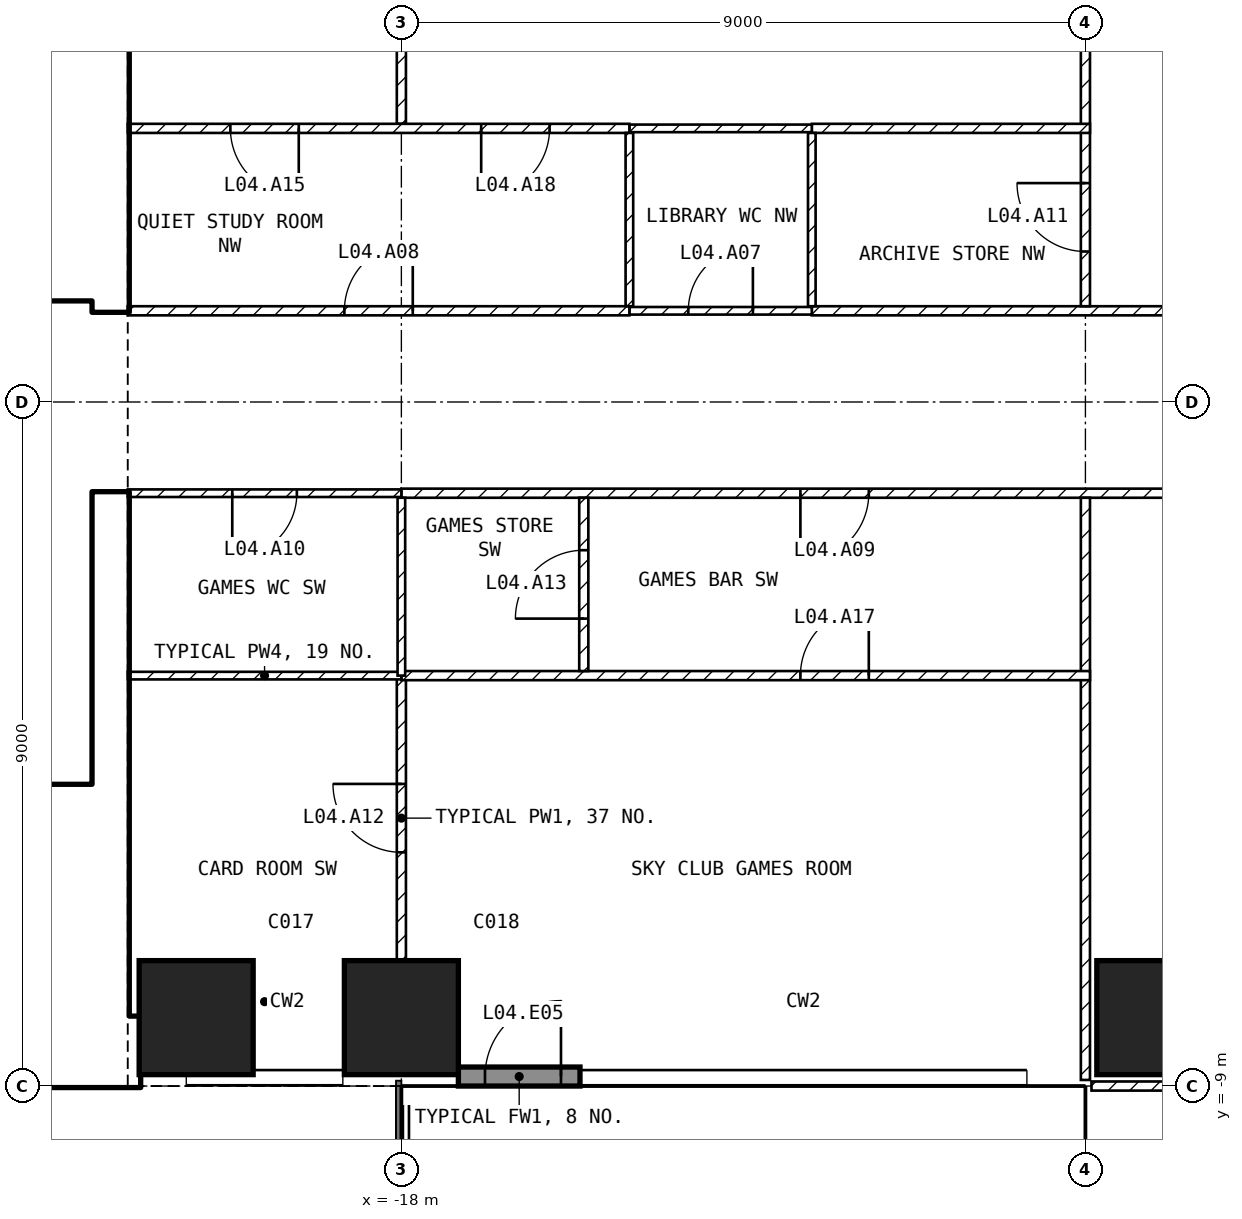
"""IFC4 building model, lengths in metres.
Left out: names, types, materials, properties, quantities, classifications, styles, units other than length and angle.
Written with IfcOpenShell. Run it as: python <this file> out.ifc"""

import sys

from ifc_helpers import new_model, si_unit, direction, frame, frame_2d, origin, origin_2d, place, context, subcontext, project, spatial, rectangle, extrude, element, fill, save


model = new_model("IFC4")
c1 = context("Model", 3, precision=1e-05, world=origin(), true_north=direction((0.0, 1.0)))
c2 = subcontext(c1, "Body", "Model", "MODEL_VIEW")
j1 = project(units=[si_unit("LENGTHUNIT", "METRE"), si_unit("PLANEANGLEUNIT", "RADIAN")], contexts=[c1])
p1 = place(None, origin())
s1 = spatial("IfcSite", under=j1, at=p1, CompositionType="ELEMENT")
p2 = place(p1, origin())
s2 = spatial("IfcBuilding", under=s1, at=p2, CompositionType="ELEMENT")
p3 = place(p2, frame((0.0, 0.0, 32.0)))
s3 = spatial("IfcBuildingStorey", under=s2, at=p3, CompositionType="ELEMENT", Elevation=32.0)
for number, where, z_axis, x_axis in (
    (1, (-20.7, -8.1, -0.3), (0.0, 0.0, 1.0), (1.0, 0.0, 0.0)),
    (2, (-18.0, -8.1, -0.3), (0.0, 0.0, 1.0), (1.0, 0.0, 0.0)),
    (3, (-8.1, -8.1, -0.3), (0.0, 0.0, 1.0), (1.0, 0.0, 0.0)),
):
    element("IfcColumn", number, at=place(p3, frame(where, z_axis=z_axis, x_axis=x_axis)), inside=s3, PredefinedType="COLUMN", context=c2, shape_type="SweptSolid", body=[
        extrude(rectangle(XDim=1.5, YDim=1.5, at=origin_2d()), origin(), (0.0, 0.0, 1.0), 4.55),
    ])
p4 = place(p3, frame((-17.25, -8.875, 0.0), z_axis=(0.0, 0.0, 1.0), x_axis=(1.0, 0.0, 0.0)))
e4 = element("IfcWall", 4, at=p4, inside=s3, PredefinedType="SOLIDWALL", context=c2, shape_type="SweptSolid", body=[
    extrude(rectangle(XDim=1.6, YDim=0.25, at=frame_2d((0.8, 0.0))), origin(), (0.0, 0.0, 1.0), 4.25),
])
p5 = place(p4, frame((0.35, 0.0, 0.0)))
e5 = element("IfcOpeningElement", 5, at=p5, cuts=e4, PredefinedType="OPENING", context=c2, shape_type="SweptSolid", body=[
    extrude(rectangle(XDim=1.0, YDim=2.4, at=frame_2d((0.5, 1.2))), frame((0.0, 0.135, 0.0), z_axis=(0.0, -1.0, 0.0), x_axis=(1.0, 0.0, 0.0)), (0.0, 0.0, 1.0), 0.27),
])
p6 = place(p3, frame((-32.4, -8.55, 0.0), z_axis=(0.0, 0.0, 1.0), x_axis=(1.0, 0.0, 0.0)))
e6 = element("IfcWall", 6, at=p6, inside=s3, PredefinedType="SHEAR", context=c2, shape_type="SweptSolid", body=[
    extrude(rectangle(XDim=10.95, YDim=0.9, at=frame_2d((5.475, 0.0))), origin(), (0.0, 0.0, 1.0), 4.25),
])
for number, where, z_axis, x_axis in (
    (7, (-21.825, -8.1, 0.0), (0.0, 0.0, 1.0), (0.0, 1.0, 0.0)),
    (8, (-21.825, 1.2, 0.0), (0.0, 0.0, 1.0), (0.0, 1.0, 0.0)),
):
    element("IfcWall", number, at=place(p3, frame(where, z_axis=z_axis, x_axis=x_axis)), inside=s3, PredefinedType="SHEAR", context=c2, shape_type="SweptSolid", body=[
        extrude(rectangle(XDim=6.9, YDim=0.45, at=frame_2d((3.45, 0.0))), origin(), (0.0, 0.0, 1.0), 4.25),
    ])
p7 = place(p3, frame((-35.1, 1.45, 0.0), z_axis=(0.0, 0.0, 1.0), x_axis=(1.0, 0.0, 0.0)))
e9 = element("IfcWall", 9, at=p7, inside=s3, PredefinedType="SOLIDWALL", context=c2, shape_type="SweptSolid", body=[
    extrude(rectangle(XDim=13.05, YDim=0.2, at=frame_2d((6.525, 0.0))), origin(), (0.0, 0.0, 1.0), 4.25),
])
p8 = place(p7, frame((11.3, 0.0, 0.0)))
e10 = element("IfcOpeningElement", 10, at=p8, cuts=e9, PredefinedType="OPENING", context=c2, shape_type="SweptSolid", body=[
    extrude(rectangle(XDim=1.0, YDim=2.1, at=frame_2d((0.5, 1.05))), frame((0.0, 0.11, 0.0), z_axis=(0.0, -1.0, 0.0), x_axis=(1.0, 0.0, 0.0)), (0.0, 0.0, 1.0), 0.22),
])
p9 = place(p7, frame((8.8, 0.0, 0.0)))
e11 = element("IfcOpeningElement", 11, at=p9, cuts=e9, PredefinedType="OPENING", context=c2, shape_type="SweptSolid", body=[
    extrude(rectangle(XDim=1.0, YDim=2.1, at=frame_2d((0.5, 1.05))), frame((0.0, 0.11, 0.0), z_axis=(0.0, -1.0, 0.0), x_axis=(1.0, 0.0, 0.0)), (0.0, 0.0, 1.0), 0.22),
])
p10 = place(p3, frame((-28.35, -5.15, 0.0), z_axis=(0.0, 0.0, 1.0), x_axis=(1.0, 0.0, 0.0)))
e12 = element("IfcWall", 12, at=p10, inside=s3, PredefinedType="SOLIDWALL", context=c2, shape_type="SweptSolid", body=[
    extrude(rectangle(XDim=6.3, YDim=0.2, at=frame_2d((3.15, 0.0))), origin(), (0.0, 0.0, 1.0), 4.25),
])
p11 = place(p10, frame((5.1, 0.0, 0.0)))
e13 = element("IfcOpeningElement", 13, at=p11, cuts=e12, PredefinedType="OPENING", context=c2, shape_type="SweptSolid", body=[
    extrude(rectangle(XDim=1.0, YDim=2.1, at=frame_2d((0.5, 1.05))), frame((0.0, 0.11, 0.0), z_axis=(0.0, -1.0, 0.0), x_axis=(1.0, 0.0, 0.0)), (0.0, 0.0, 1.0), 0.22),
])
p12 = place(p3, frame((-12.6, 1.2, 0.0), z_axis=(0.0, 0.0, 1.0), x_axis=(1.0, 0.0, 0.0)))
e14 = element("IfcWall", 14, at=p12, inside=s3, PredefinedType="PARTITIONING", context=c2, shape_type="SweptSolid", body=[
    extrude(rectangle(XDim=30.6, YDim=0.12, at=frame_2d((15.3, 0.0))), origin(), (0.0, 0.0, 1.0), 4.25),
])
p13 = place(p12, frame((11.7, 0.0, 0.0)))
e15 = element("IfcOpeningElement", 15, at=p13, cuts=e14, PredefinedType="OPENING", context=c2, shape_type="SweptSolid", body=[
    extrude(rectangle(XDim=1.8, YDim=2.1, at=frame_2d((0.9, 1.05))), frame((0.0, 0.07, 0.0), z_axis=(0.0, -1.0, 0.0), x_axis=(1.0, 0.0, 0.0)), (0.0, 0.0, 1.0), 0.14),
])
p14 = place(p12, frame((28.35, 0.0, 0.0)))
e16 = element("IfcOpeningElement", 16, at=p14, cuts=e14, PredefinedType="OPENING", context=c2, shape_type="SweptSolid", body=[
    extrude(rectangle(XDim=0.9, YDim=2.1, at=frame_2d((0.45, 1.05))), frame((0.0, 0.07, 0.0), z_axis=(0.0, -1.0, 0.0), x_axis=(1.0, 0.0, 0.0)), (0.0, 0.0, 1.0), 0.14),
])
p15 = place(p3, frame((18.0, -1.2, 0.0), z_axis=(0.0, 0.0, 1.0), x_axis=(-1.0, 0.0, 0.0)))
e17 = element("IfcWall", 17, at=p15, inside=s3, PredefinedType="PARTITIONING", context=c2, shape_type="SweptSolid", body=[
    extrude(rectangle(XDim=36.0, YDim=0.12, at=frame_2d((18.0, 0.0))), origin(), (0.0, 0.0, 1.0), 4.25),
])
p16 = place(p15, frame((17.1, 0.0, 0.0)))
e18 = element("IfcOpeningElement", 18, at=p16, cuts=e17, PredefinedType="OPENING", context=c2, shape_type="SweptSolid", body=[
    extrude(rectangle(XDim=1.8, YDim=2.1, at=frame_2d((0.9, 1.05))), frame((0.0, 0.07, 0.0), z_axis=(0.0, -1.0, 0.0), x_axis=(1.0, 0.0, 0.0)), (0.0, 0.0, 1.0), 0.14),
])
p17 = place(p15, frame((2.25, 0.0, 0.0)))
e19 = element("IfcOpeningElement", 19, at=p17, cuts=e17, PredefinedType="OPENING", context=c2, shape_type="SweptSolid", body=[
    extrude(rectangle(XDim=0.9, YDim=2.1, at=frame_2d((0.45, 1.05))), frame((0.0, 0.07, 0.0), z_axis=(0.0, -1.0, 0.0), x_axis=(1.0, 0.0, 0.0)), (0.0, 0.0, 1.0), 0.14),
])
p18 = place(p15, frame((29.85, 0.0, 0.0)))
e20 = element("IfcOpeningElement", 20, at=p18, cuts=e17, PredefinedType="OPENING", context=c2, shape_type="SweptSolid", body=[
    extrude(rectangle(XDim=0.9, YDim=2.1, at=frame_2d((0.45, 1.05))), frame((0.0, 0.07, 0.0), z_axis=(0.0, -1.0, 0.0), x_axis=(1.0, 0.0, 0.0)), (0.0, 0.0, 1.0), 0.14),
])
p19 = place(p3, frame((-15.0, 1.2, 0.0), z_axis=(0.0, 0.0, 1.0), x_axis=(1.0, 0.0, 0.0)))
e21 = element("IfcWall", 21, at=p19, inside=s3, PredefinedType="PARTITIONING", context=c2, shape_type="SweptSolid", body=[
    extrude(rectangle(XDim=2.4, YDim=0.1, at=frame_2d((1.2, 0.0))), origin(), (0.0, 0.0, 1.0), 4.25),
])
p20 = place(p19, frame((0.775, 0.0, 0.0)))
e22 = element("IfcOpeningElement", 22, at=p20, cuts=e21, PredefinedType="OPENING", context=c2, shape_type="SweptSolid", body=[
    extrude(rectangle(XDim=0.85, YDim=2.1, at=frame_2d((0.425, 1.05))), frame((0.0, 0.06, 0.0), z_axis=(0.0, -1.0, 0.0), x_axis=(1.0, 0.0, 0.0)), (0.0, 0.0, 1.0), 0.12),
])
p21 = place(p3, frame((-21.6, 1.2, 0.0), z_axis=(0.0, 0.0, 1.0), x_axis=(1.0, 0.0, 0.0)))
e23 = element("IfcWall", 23, at=p21, inside=s3, PredefinedType="PARTITIONING", context=c2, shape_type="SweptSolid", body=[
    extrude(rectangle(XDim=6.6, YDim=0.12, at=frame_2d((3.3, 0.0))), origin(), (0.0, 0.0, 1.0), 4.25),
])
p22 = place(p21, frame((2.85, 0.0, 0.0)))
e24 = element("IfcOpeningElement", 24, at=p22, cuts=e23, PredefinedType="OPENING", context=c2, shape_type="SweptSolid", body=[
    extrude(rectangle(XDim=0.9, YDim=2.1, at=frame_2d((0.45, 1.05))), frame((0.0, 0.07, 0.0), z_axis=(0.0, -1.0, 0.0), x_axis=(1.0, 0.0, 0.0)), (0.0, 0.0, 1.0), 0.14),
])
p23 = place(p3, frame((-18.0, -1.2, 0.0), z_axis=(0.0, 0.0, 1.0), x_axis=(-1.0, 0.0, 0.0)))
e25 = element("IfcWall", 25, at=p23, inside=s3, PredefinedType="PARTITIONING", context=c2, shape_type="SweptSolid", body=[
    extrude(rectangle(XDim=3.6, YDim=0.1, at=frame_2d((1.8, 0.0))), origin(), (0.0, 0.0, 1.0), 4.25),
])
p24 = place(p23, frame((1.375, 0.0, 0.0)))
e26 = element("IfcOpeningElement", 26, at=p24, cuts=e25, PredefinedType="OPENING", context=c2, shape_type="SweptSolid", body=[
    extrude(rectangle(XDim=0.85, YDim=2.1, at=frame_2d((0.425, 1.05))), frame((0.0, 0.06, 0.0), z_axis=(0.0, -1.0, 0.0), x_axis=(1.0, 0.0, 0.0)), (0.0, 0.0, 1.0), 0.12),
])
p25 = place(p3, frame((-9.0, 1.26, 0.0), z_axis=(0.0, 0.0, 1.0), x_axis=(0.0, 1.0, 0.0)))
e27 = element("IfcWall", 27, at=p25, inside=s3, PredefinedType="PARTITIONING", context=c2, shape_type="SweptSolid", body=[
    extrude(rectangle(XDim=7.66, YDim=0.12, at=frame_2d((3.83, 0.0))), origin(), (0.0, 0.0, 1.0), 4.25),
])
p26 = place(p25, frame((0.72, 0.0, 0.0)))
e28 = element("IfcOpeningElement", 28, at=p26, cuts=e27, PredefinedType="OPENING", context=c2, shape_type="SweptSolid", body=[
    extrude(rectangle(XDim=0.9, YDim=2.1, at=frame_2d((0.45, 1.05))), frame((0.0, 0.07, 0.0), z_axis=(0.0, -1.0, 0.0), x_axis=(1.0, 0.0, 0.0)), (0.0, 0.0, 1.0), 0.14),
])
p27 = place(p3, frame((-9.0, -8.92, 0.0), z_axis=(0.0, 0.0, 1.0), x_axis=(0.0, 1.0, 0.0)))
e29 = element("IfcWall", 29, at=p27, inside=s3, PredefinedType="PARTITIONING", context=c2, shape_type="SweptSolid", body=[
    extrude(rectangle(XDim=7.66, YDim=0.12, at=frame_2d((3.83, 0.0))), origin(), (0.0, 0.0, 1.0), 4.25),
])
p28 = place(p3, frame((2.1, -9.0, 0.0), z_axis=(0.0, 0.0, 1.0), x_axis=(-1.0, 0.0, 0.0)))
e30 = element("IfcWall", 30, at=p28, inside=s3, PredefinedType="PARTITIONING", context=c2, shape_type="SweptSolid", body=[
    extrude(rectangle(XDim=11.02, YDim=0.12, at=frame_2d((5.51, 0.0))), origin(), (0.0, 0.0, 1.0), 4.25),
])
p29 = place(p28, frame((1.2, 0.0, 0.0)))
e31 = element("IfcOpeningElement", 31, at=p29, cuts=e30, PredefinedType="OPENING", context=c2, shape_type="SweptSolid", body=[
    extrude(rectangle(XDim=1.8, YDim=2.1, at=frame_2d((0.9, 1.05))), frame((0.0, 0.07, 0.0), z_axis=(0.0, -1.0, 0.0), x_axis=(1.0, 0.0, 0.0)), (0.0, 0.0, 1.0), 0.14),
])
p30 = place(p3, frame((-18.0, 3.66, 0.0), z_axis=(0.0, 0.0, 1.0), x_axis=(0.0, 1.0, 0.0)))
e32 = element("IfcWall", 32, at=p30, inside=s3, PredefinedType="PARTITIONING", context=c2, shape_type="SweptSolid", body=[
    extrude(rectangle(XDim=3.69, YDim=0.12, at=frame_2d((1.845, 0.0))), origin(), (0.0, 0.0, 1.0), 3.346),
])
p31 = place(p3, frame((-8.94, 3.6, 0.0), z_axis=(0.0, 0.0, 1.0), x_axis=(-1.0, 0.0, 0.0)))
e33 = element("IfcWall", 33, at=p31, inside=s3, PredefinedType="PARTITIONING", context=c2, shape_type="SweptSolid", body=[
    extrude(rectangle(XDim=3.66, YDim=0.12, at=frame_2d((1.83, 0.0))), origin(), (0.0, 0.0, 1.0), 4.25),
])
p32 = place(p3, frame((-12.6, 3.6, 0.0), z_axis=(0.0, 0.0, 1.0), x_axis=(-1.0, 0.0, 0.0)))
e34 = element("IfcWall", 34, at=p32, inside=s3, PredefinedType="PARTITIONING", context=c2, shape_type="SweptSolid", body=[
    extrude(rectangle(XDim=2.4, YDim=0.1, at=frame_2d((1.2, 0.0))), origin(), (0.0, 0.0, 1.0), 4.25),
])
p33 = place(p3, frame((-15.0, 3.6, 0.0), z_axis=(0.0, 0.0, 1.0), x_axis=(-1.0, 0.0, 0.0)))
e35 = element("IfcWall", 35, at=p33, inside=s3, PredefinedType="PARTITIONING", context=c2, shape_type="SweptSolid", body=[
    extrude(rectangle(XDim=6.6, YDim=0.12, at=frame_2d((3.3, 0.0))), origin(), (0.0, 0.0, 1.0), 4.25),
])
p34 = place(p33, frame((4.35, 0.0, 0.0)))
e36 = element("IfcOpeningElement", 36, at=p34, cuts=e35, PredefinedType="OPENING", context=c2, shape_type="SweptSolid", body=[
    extrude(rectangle(XDim=0.9, YDim=2.1, at=frame_2d((0.45, 1.05))), frame((0.0, 0.07, 0.0), z_axis=(0.0, -1.0, 0.0), x_axis=(1.0, 0.0, 0.0)), (0.0, 0.0, 1.0), 0.14),
])
p35 = place(p33, frame((1.05, 0.0, 0.0)))
e37 = element("IfcOpeningElement", 37, at=p35, cuts=e35, PredefinedType="OPENING", context=c2, shape_type="SweptSolid", body=[
    extrude(rectangle(XDim=0.9, YDim=2.1, at=frame_2d((0.45, 1.05))), frame((0.0, 0.07, 0.0), z_axis=(0.0, -1.0, 0.0), x_axis=(1.0, 0.0, 0.0)), (0.0, 0.0, 1.0), 0.14),
])
for number, where, z_axis, x_axis in (
    (38, (-12.6, 1.26, 0.0), (0.0, 0.0, 1.0), (0.0, 1.0, 0.0)),
    (39, (-15.0, 1.26, 0.0), (0.0, 0.0, 1.0), (0.0, 1.0, 0.0)),
):
    element("IfcWall", number, at=place(p3, frame(where, z_axis=z_axis, x_axis=x_axis)), inside=s3, PredefinedType="PARTITIONING", context=c2, shape_type="SweptSolid", body=[
        extrude(rectangle(XDim=2.28, YDim=0.1, at=frame_2d((1.14, 0.0))), origin(), (0.0, 0.0, 1.0), 4.25),
    ])
p36 = place(p3, frame((-18.0, -7.35, 0.0), z_axis=(0.0, 0.0, 1.0), x_axis=(0.0, 1.0, 0.0)))
e40 = element("IfcWall", 40, at=p36, inside=s3, PredefinedType="PARTITIONING", context=c2, shape_type="SweptSolid", body=[
    extrude(rectangle(XDim=3.75, YDim=0.12, at=frame_2d((1.875, 0.0))), origin(), (0.0, 0.0, 1.0), 3.346),
])
p37 = place(p36, frame((1.425, 0.0, 0.0)))
e41 = element("IfcOpeningElement", 41, at=p37, cuts=e40, PredefinedType="OPENING", context=c2, shape_type="SweptSolid", body=[
    extrude(rectangle(XDim=0.9, YDim=2.1, at=frame_2d((0.45, 1.05))), frame((0.0, 0.07, 0.0), z_axis=(0.0, -1.0, 0.0), x_axis=(1.0, 0.0, 0.0)), (0.0, 0.0, 1.0), 0.14),
])
p38 = place(p3, frame((-18.0, -3.6, 0.0), z_axis=(0.0, 0.0, 1.0), x_axis=(1.0, 0.0, 0.0)))
e42 = element("IfcWall", 42, at=p38, inside=s3, PredefinedType="PARTITIONING", context=c2, shape_type="SweptSolid", body=[
    extrude(rectangle(XDim=9.06, YDim=0.12, at=frame_2d((4.53, 0.0))), origin(), (0.0, 0.0, 1.0), 4.25),
])
p39 = place(p38, frame((5.25, 0.0, 0.0)))
e43 = element("IfcOpeningElement", 43, at=p39, cuts=e42, PredefinedType="OPENING", context=c2, shape_type="SweptSolid", body=[
    extrude(rectangle(XDim=0.9, YDim=2.1, at=frame_2d((0.45, 1.05))), frame((0.0, 0.07, 0.0), z_axis=(0.0, -1.0, 0.0), x_axis=(1.0, 0.0, 0.0)), (0.0, 0.0, 1.0), 0.14),
])
p40 = place(p3, frame((-21.6, -3.6, 0.0), z_axis=(0.0, 0.0, 1.0), x_axis=(1.0, 0.0, 0.0)))
e44 = element("IfcWall", 44, at=p40, inside=s3, PredefinedType="PARTITIONING", context=c2, shape_type="SweptSolid", body=[
    extrude(rectangle(XDim=3.6, YDim=0.1, at=frame_2d((1.8, 0.0))), origin(), (0.0, 0.0, 1.0), 4.25),
])
p41 = place(p3, frame((-15.6, -3.54, 0.0), z_axis=(0.0, 0.0, 1.0), x_axis=(0.0, 1.0, 0.0)))
e45 = element("IfcWall", 45, at=p41, inside=s3, PredefinedType="PARTITIONING", context=c2, shape_type="SweptSolid", body=[
    extrude(rectangle(XDim=2.28, YDim=0.12, at=frame_2d((1.14, 0.0))), origin(), (0.0, 0.0, 1.0), 4.25),
])
p42 = place(p41, frame((0.69, 0.0, 0.0)))
e46 = element("IfcOpeningElement", 46, at=p42, cuts=e45, PredefinedType="OPENING", context=c2, shape_type="SweptSolid", body=[
    extrude(rectangle(XDim=0.9, YDim=2.1, at=frame_2d((0.45, 1.05))), frame((0.0, 0.07, 0.0), z_axis=(0.0, -1.0, 0.0), x_axis=(1.0, 0.0, 0.0)), (0.0, 0.0, 1.0), 0.14),
])
p43 = place(p3, frame((-18.0, -3.6, 0.0), z_axis=(0.0, 0.0, 1.0), x_axis=(0.0, 1.0, 0.0)))
e47 = element("IfcWall", 47, at=p43, inside=s3, PredefinedType="PARTITIONING", context=c2, shape_type="SweptSolid", body=[
    extrude(rectangle(XDim=2.34, YDim=0.1, at=frame_2d((1.17, 0.0))), origin(), (0.0, 0.0, 1.0), 3.346),
])
p44 = place(p5, origin())
e48 = element("IfcDoor", 48, at=p44, inside=s3, OperationType="SINGLE_SWING_RIGHT", PredefinedType="DOOR", context=c2, shape_type="SweptSolid", body=[
    extrude(rectangle(XDim=1.0, YDim=2.4, at=frame_2d((0.5, 1.2))), frame((0.0, 0.025, 0.0), z_axis=(0.0, -1.0, 0.0), x_axis=(1.0, 0.0, 0.0)), (0.0, 0.0, 1.0), 0.05),
])
fill(e5, e48)
p45 = place(p11, origin())
e49 = element("IfcDoor", 49, at=p45, inside=s3, OperationType="SINGLE_SWING_LEFT", PredefinedType="DOOR", context=c2, shape_type="SweptSolid", body=[
    extrude(rectangle(XDim=1.0, YDim=2.1, at=frame_2d((0.5, 1.05))), frame((0.0, 0.025, 0.0), z_axis=(0.0, -1.0, 0.0), x_axis=(1.0, 0.0, 0.0)), (0.0, 0.0, 1.0), 0.05),
])
fill(e13, e49)
p46 = place(p20, origin())
e50 = element("IfcDoor", 50, at=p46, inside=s3, OperationType="SINGLE_SWING_RIGHT", PredefinedType="DOOR", context=c2, shape_type="SweptSolid", body=[
    extrude(rectangle(XDim=0.85, YDim=2.1, at=frame_2d((0.425, 1.05))), frame((0.0, 0.025, 0.0), z_axis=(0.0, -1.0, 0.0), x_axis=(1.0, 0.0, 0.0)), (0.0, 0.0, 1.0), 0.05),
])
fill(e22, e50)
p47 = place(p22, origin())
e51 = element("IfcDoor", 51, at=p47, inside=s3, OperationType="SINGLE_SWING_RIGHT", PredefinedType="DOOR", context=c2, shape_type="SweptSolid", body=[
    extrude(rectangle(XDim=0.9, YDim=2.1, at=frame_2d((0.45, 1.05))), frame((0.0, 0.025, 0.0), z_axis=(0.0, -1.0, 0.0), x_axis=(1.0, 0.0, 0.0)), (0.0, 0.0, 1.0), 0.05),
])
fill(e24, e51)
p48 = place(p18, origin())
e52 = element("IfcDoor", 52, at=p48, inside=s3, OperationType="SINGLE_SWING_RIGHT", PredefinedType="DOOR", context=c2, shape_type="SweptSolid", body=[
    extrude(rectangle(XDim=0.9, YDim=2.1, at=frame_2d((0.45, 1.05))), frame((0.0, 0.025, 0.0), z_axis=(0.0, -1.0, 0.0), x_axis=(1.0, 0.0, 0.0)), (0.0, 0.0, 1.0), 0.05),
])
fill(e20, e52)
p49 = place(p24, origin())
e53 = element("IfcDoor", 53, at=p49, inside=s3, OperationType="SINGLE_SWING_RIGHT", PredefinedType="DOOR", context=c2, shape_type="SweptSolid", body=[
    extrude(rectangle(XDim=0.85, YDim=2.1, at=frame_2d((0.425, 1.05))), frame((0.0, 0.025, 0.0), z_axis=(0.0, -1.0, 0.0), x_axis=(1.0, 0.0, 0.0)), (0.0, 0.0, 1.0), 0.05),
])
fill(e26, e53)
p50 = place(p26, origin())
e54 = element("IfcDoor", 54, at=p50, inside=s3, OperationType="SINGLE_SWING_RIGHT", PredefinedType="DOOR", context=c2, shape_type="SweptSolid", body=[
    extrude(rectangle(XDim=0.9, YDim=2.1, at=frame_2d((0.45, 1.05))), frame((0.0, 0.025, 0.0), z_axis=(0.0, -1.0, 0.0), x_axis=(1.0, 0.0, 0.0)), (0.0, 0.0, 1.0), 0.05),
])
fill(e28, e54)
p51 = place(p37, origin())
e55 = element("IfcDoor", 55, at=p51, inside=s3, OperationType="SINGLE_SWING_RIGHT", PredefinedType="DOOR", context=c2, shape_type="SweptSolid", body=[
    extrude(rectangle(XDim=0.9, YDim=2.1, at=frame_2d((0.45, 1.05))), frame((0.0, 0.025, 0.0), z_axis=(0.0, -1.0, 0.0), x_axis=(1.0, 0.0, 0.0)), (0.0, 0.0, 1.0), 0.05),
])
fill(e41, e55)
p52 = place(p42, origin())
e56 = element("IfcDoor", 56, at=p52, inside=s3, OperationType="SINGLE_SWING_LEFT", PredefinedType="DOOR", context=c2, shape_type="SweptSolid", body=[
    extrude(rectangle(XDim=0.9, YDim=2.1, at=frame_2d((0.45, 1.05))), frame((0.0, 0.025, 0.0), z_axis=(0.0, -1.0, 0.0), x_axis=(1.0, 0.0, 0.0)), (0.0, 0.0, 1.0), 0.05),
])
fill(e46, e56)
p53 = place(p34, origin())
e57 = element("IfcDoor", 57, at=p53, inside=s3, OperationType="SINGLE_SWING_LEFT", PredefinedType="DOOR", context=c2, shape_type="SweptSolid", body=[
    extrude(rectangle(XDim=0.9, YDim=2.1, at=frame_2d((0.45, 1.05))), frame((0.0, 0.025, 0.0), z_axis=(0.0, -1.0, 0.0), x_axis=(1.0, 0.0, 0.0)), (0.0, 0.0, 1.0), 0.05),
])
fill(e36, e57)
p54 = place(p39, origin())
e58 = element("IfcDoor", 58, at=p54, inside=s3, OperationType="SINGLE_SWING_RIGHT", PredefinedType="DOOR", context=c2, shape_type="SweptSolid", body=[
    extrude(rectangle(XDim=0.9, YDim=2.1, at=frame_2d((0.45, 1.05))), frame((0.0, 0.025, 0.0), z_axis=(0.0, -1.0, 0.0), x_axis=(1.0, 0.0, 0.0)), (0.0, 0.0, 1.0), 0.05),
])
fill(e43, e58)
p55 = place(p35, origin())
e59 = element("IfcDoor", 59, at=p55, inside=s3, OperationType="SINGLE_SWING_RIGHT", PredefinedType="DOOR", context=c2, shape_type="SweptSolid", body=[
    extrude(rectangle(XDim=0.9, YDim=2.1, at=frame_2d((0.45, 1.05))), frame((0.0, 0.025, 0.0), z_axis=(0.0, -1.0, 0.0), x_axis=(1.0, 0.0, 0.0)), (0.0, 0.0, 1.0), 0.05),
])
fill(e37, e59)
save(model, sys.argv[1])
